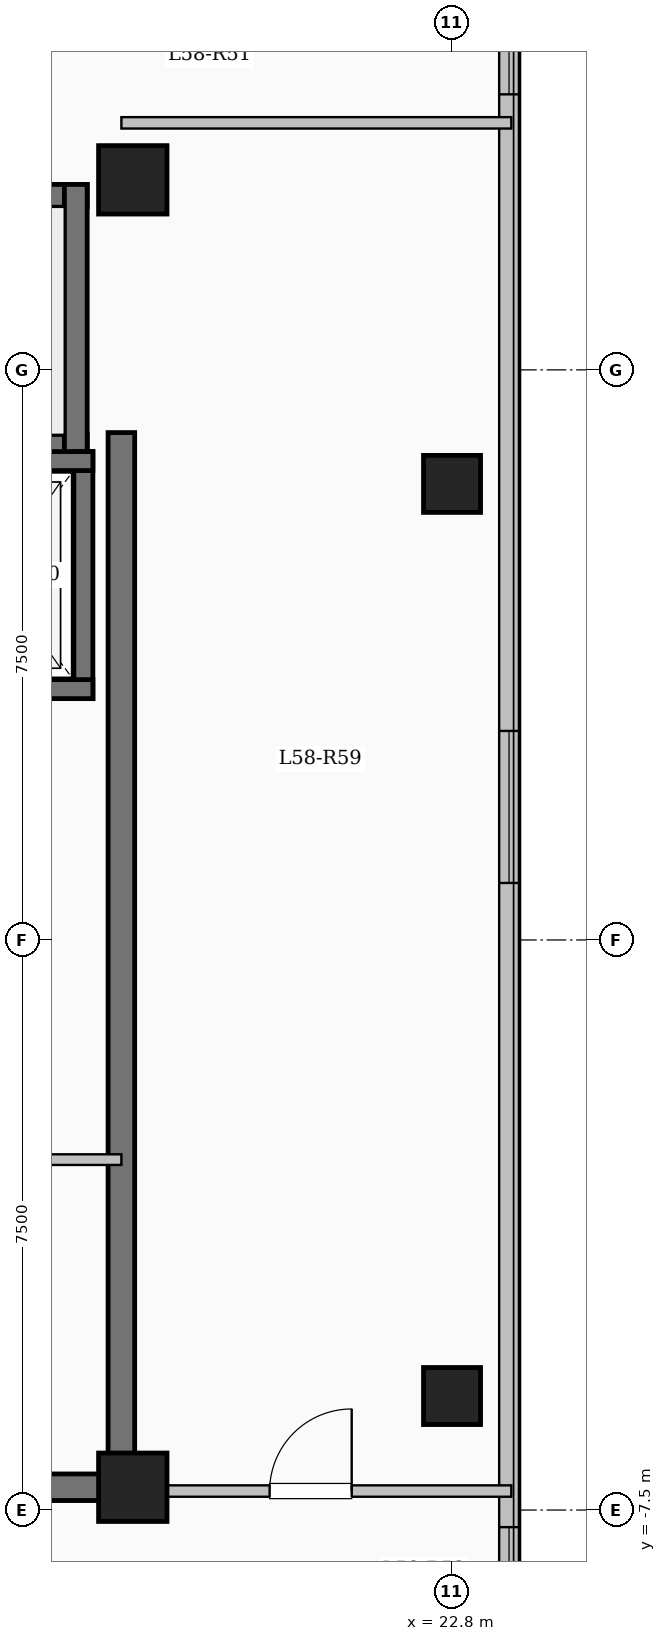
"""IFC4 building model, lengths in metres.
Left out: names, types, materials, properties, quantities, classifications, styles, units other than length and angle.
Written with IfcOpenShell. Run it as: python <this file> out.ifc"""

import sys

from ifc_helpers import new_model, si_unit, direction, frame, frame_2d, origin, origin_2d, place, context, subcontext, project, spatial, rectangle, extrude, element, fill, save


model = new_model("IFC4")
c1 = context("Model", 3, precision=1e-05, world=origin(), true_north=direction((0.0, 1.0)))
c2 = subcontext(c1, "Body", "Model", "MODEL_VIEW")
j1 = project(units=[si_unit("LENGTHUNIT", "METRE"), si_unit("PLANEANGLEUNIT", "RADIAN")], contexts=[c1])
p1 = place(None, origin())
s1 = spatial("IfcSite", under=j1, at=p1, CompositionType="ELEMENT")
p2 = place(p1, origin())
s2 = spatial("IfcBuilding", under=s1, at=p2, CompositionType="ELEMENT")
p3 = place(p2, frame((0.0, 0.0, 213.7)))
s3 = spatial("IfcBuildingStorey", under=s2, at=p3, CompositionType="ELEMENT", Elevation=213.7)
for number, where, z_axis, x_axis in (
    (1, (18.6, -7.2, 0.0), (0.0, 0.0, 1.0), (1.0, 0.0, 0.0)),
    (2, (18.6, 10.0, 0.0), (0.0, 0.0, 1.0), (1.0, 0.0, 0.0)),
):
    element("IfcColumn", number, at=place(p3, frame(where, z_axis=z_axis, x_axis=x_axis)), inside=s3, PredefinedType="COLUMN", context=c2, shape_type="SweptSolid", body=[
        extrude(rectangle(XDim=0.9, YDim=0.9, at=origin_2d()), origin(), (0.0, 0.0, 1.0), 3.35),
    ])
for number, where, z_axis, x_axis in (
    (3, (22.8, -6.0, 0.0), (0.0, 0.0, 1.0), (1.0, 0.0, 0.0)),
    (4, (22.8, 6.0, 0.0), (0.0, 0.0, 1.0), (1.0, 0.0, 0.0)),
):
    element("IfcColumn", number, at=place(p3, frame(where, z_axis=z_axis, x_axis=x_axis)), inside=s3, PredefinedType="COLUMN", context=c2, shape_type="SweptSolid", body=[
        extrude(rectangle(XDim=0.75, YDim=0.75, at=origin_2d()), origin(), (0.0, 0.0, 1.0), 3.35),
    ])
p4 = place(p3, frame((23.55, 17.25, 0.0), z_axis=(0.0, 0.0, 1.0), x_axis=(0.0, -1.0, 0.0)))
e5 = element("IfcWall", 5, at=p4, inside=s3, PredefinedType="SOLIDWALL", context=c2, shape_type="SweptSolid", body=[
    extrude(rectangle(XDim=34.5, YDim=0.26, at=frame_2d((17.25, 0.0))), origin(), (0.0, 0.0, 1.0), 3.1),
])
p5 = place(p4, frame((1.375, 0.0, 0.9)))
e6 = element("IfcOpeningElement", 6, at=p5, cuts=e5, PredefinedType="OPENING", context=c2, shape_type="SweptSolid", body=[
    extrude(rectangle(XDim=2.0, YDim=1.7, at=frame_2d((1.0, 0.85))), frame((0.0, 0.14, 0.0), z_axis=(0.0, -1.0, 0.0), x_axis=(1.0, 0.0, 0.0)), (0.0, 0.0, 1.0), 0.28),
])
p6 = place(p4, frame((5.125, 0.0, 0.95)))
e7 = element("IfcOpeningElement", 7, at=p6, cuts=e5, PredefinedType="OPENING", context=c2, shape_type="SweptSolid", body=[
    extrude(rectangle(XDim=1.0, YDim=1.5, at=frame_2d((0.5, 0.75))), frame((0.0, 0.14, 0.0), z_axis=(0.0, -1.0, 0.0), x_axis=(1.0, 0.0, 0.0)), (0.0, 0.0, 1.0), 0.28),
])
p7 = place(p4, frame((14.5, 0.0, 0.9)))
e8 = element("IfcOpeningElement", 8, at=p7, cuts=e5, PredefinedType="OPENING", context=c2, shape_type="SweptSolid", body=[
    extrude(rectangle(XDim=2.0, YDim=1.7, at=frame_2d((1.0, 0.85))), frame((0.0, 0.14, 0.0), z_axis=(0.0, -1.0, 0.0), x_axis=(1.0, 0.0, 0.0)), (0.0, 0.0, 1.0), 0.28),
])
p8 = place(p4, frame((24.975, 0.0, 0.95)))
e9 = element("IfcOpeningElement", 9, at=p8, cuts=e5, PredefinedType="OPENING", context=c2, shape_type="SweptSolid", body=[
    extrude(rectangle(XDim=1.2, YDim=1.5, at=frame_2d((0.6, 0.75))), frame((0.0, 0.14, 0.0), z_axis=(0.0, -1.0, 0.0), x_axis=(1.0, 0.0, 0.0)), (0.0, 0.0, 1.0), 0.28),
])
p9 = place(p4, frame((29.475, 0.0, 0.9)))
e10 = element("IfcOpeningElement", 10, at=p9, cuts=e5, PredefinedType="OPENING", context=c2, shape_type="SweptSolid", body=[
    extrude(rectangle(XDim=2.2, YDim=1.75, at=frame_2d((1.1, 0.875))), frame((0.0, 0.14, 0.0), z_axis=(0.0, -1.0, 0.0), x_axis=(1.0, 0.0, 0.0)), (0.0, 0.0, 1.0), 0.28),
])
p10 = place(p3, frame((10.0, 9.79, 0.0), z_axis=(0.0, 0.0, 1.0), x_axis=(1.0, 0.0, 0.0)))
e11 = element("IfcWall", 11, at=p10, inside=s3, PredefinedType="SHEAR", context=c2, shape_type="SweptSolid", body=[
    extrude(rectangle(XDim=8.0, YDim=0.3, at=frame_2d((4.0, 0.0))), origin(), (0.0, 0.0, 1.0), 3.35),
])
p11 = place(p3, frame((10.0, 6.5, 0.0), z_axis=(0.0, 0.0, 1.0), x_axis=(1.0, 0.0, 0.0)))
e12 = element("IfcWall", 12, at=p11, inside=s3, PredefinedType="SHEAR", context=c2, shape_type="SweptSolid", body=[
    extrude(rectangle(XDim=8.0, YDim=0.3, at=frame_2d((4.0, 0.0))), origin(), (0.0, 0.0, 1.0), 3.35),
])
p12 = place(p11, frame((0.55, 0.0, 0.0)))
e13 = element("IfcOpeningElement", 13, at=p12, cuts=e12, PredefinedType="OPENING", context=c2, shape_type="SweptSolid", body=[
    extrude(rectangle(XDim=1.0, YDim=2.15, at=frame_2d((0.5, 1.075))), frame((0.0, 0.16, 0.0), z_axis=(0.0, -1.0, 0.0), x_axis=(1.0, 0.0, 0.0)), (0.0, 0.0, 1.0), 0.32),
])
p13 = place(p3, frame((17.85, 6.35, 0.0), z_axis=(0.0, 0.0, 1.0), x_axis=(0.0, 1.0, 0.0)))
e14 = element("IfcWall", 14, at=p13, inside=s3, PredefinedType="SHEAR", context=c2, shape_type="SweptSolid", body=[
    extrude(rectangle(XDim=3.59, YDim=0.3, at=frame_2d((1.795, 0.0))), origin(), (0.0, 0.0, 1.0), 3.35),
])
p14 = place(p3, frame((17.95, 3.175, 0.0), z_axis=(0.0, 0.0, 1.0), x_axis=(0.0, 1.0, 0.0)))
e15 = element("IfcWall", 15, at=p14, inside=s3, PredefinedType="SHEAR", context=c2, shape_type="SweptSolid", body=[
    extrude(rectangle(XDim=3.25, YDim=0.25, at=frame_2d((1.625, 0.0))), origin(), (0.0, 0.0, 1.0), 3.35),
])
for number, where, z_axis, x_axis in (
    (16, (15.525, 3.3, 0.0), (0.0, 0.0, 1.0), (1.0, 0.0, 0.0)),
    (17, (15.525, 6.3, 0.0), (0.0, 0.0, 1.0), (1.0, 0.0, 0.0)),
):
    element("IfcWall", number, at=place(p3, frame(where, z_axis=z_axis, x_axis=x_axis)), inside=s3, PredefinedType="SHEAR", context=c2, shape_type="SweptSolid", body=[
        extrude(rectangle(XDim=2.55, YDim=0.25, at=frame_2d((1.275, 0.0))), origin(), (0.0, 0.0, 1.0), 3.35),
    ])
p15 = place(p3, frame((18.45, -7.375, 0.0), z_axis=(0.0, 0.0, 1.0), x_axis=(0.0, 1.0, 0.0)))
e18 = element("IfcWall", 18, at=p15, inside=s3, PredefinedType="SHEAR", context=c2, shape_type="SweptSolid", body=[
    extrude(rectangle(XDim=14.05, YDim=0.35, at=frame_2d((7.025, 0.0))), origin(), (0.0, 0.0, 1.0), 3.35),
])
p16 = place(p3, frame((12.625, -7.2, 0.0), z_axis=(0.0, 0.0, 1.0), x_axis=(1.0, 0.0, 0.0)))
e19 = element("IfcWall", 19, at=p16, inside=s3, PredefinedType="SHEAR", context=c2, shape_type="SweptSolid", body=[
    extrude(rectangle(XDim=6.0, YDim=0.35, at=frame_2d((3.0, 0.0))), origin(), (0.0, 0.0, 1.0), 3.35),
])
p17 = place(p3, frame((15.4, -2.89, 0.0), z_axis=(0.0, 0.0, 1.0), x_axis=(1.0, 0.0, 0.0)))
e20 = element("IfcWall", 20, at=p17, inside=s3, PredefinedType="PARTITIONING", context=c2, shape_type="SweptSolid", body=[
    extrude(rectangle(XDim=3.05, YDim=0.14, at=frame_2d((1.525, 0.0))), origin(), (0.0, 0.0, 1.0), 3.1),
])
p18 = place(p17, frame((1.05, 0.0, 0.0)))
e21 = element("IfcOpeningElement", 21, at=p18, cuts=e20, PredefinedType="OPENING", context=c2, shape_type="SweptSolid", body=[
    extrude(rectangle(XDim=0.9, YDim=2.08, at=frame_2d((0.45, 1.04))), frame((0.0, 0.08, 0.0), z_axis=(0.0, -1.0, 0.0), x_axis=(1.0, 0.0, 0.0)), (0.0, 0.0, 1.0), 0.16),
])
p19 = place(p3, frame((18.45, -7.25, 0.0), z_axis=(0.0, 0.0, 1.0), x_axis=(1.0, 0.0, 0.0)))
e22 = element("IfcWall", 22, at=p19, inside=s3, PredefinedType="PARTITIONING", context=c2, shape_type="SweptSolid", body=[
    extrude(rectangle(XDim=5.13, YDim=0.15, at=frame_2d((2.565, 0.0))), origin(), (0.0, 0.0, 1.0), 3.1),
])
p20 = place(p19, frame((1.95, 0.0, 0.0)))
e23 = element("IfcOpeningElement", 23, at=p20, cuts=e22, PredefinedType="OPENING", context=c2, shape_type="SweptSolid", body=[
    extrude(rectangle(XDim=1.08, YDim=2.15, at=frame_2d((0.54, 1.075))), frame((0.0, 0.085, 0.0), z_axis=(0.0, -1.0, 0.0), x_axis=(1.0, 0.0, 0.0)), (0.0, 0.0, 1.0), 0.17),
])
p21 = place(p3, frame((18.45, 10.75, 0.0), z_axis=(0.0, 0.0, 1.0), x_axis=(1.0, 0.0, 0.0)))
e24 = element("IfcWall", 24, at=p21, inside=s3, PredefinedType="PARTITIONING", context=c2, shape_type="SweptSolid", body=[
    extrude(rectangle(XDim=5.13, YDim=0.15, at=frame_2d((2.565, 0.0))), origin(), (0.0, 0.0, 1.0), 3.1),
])
p22 = place(p6, origin())
e25 = element("IfcWindow", 25, at=p22, inside=s3, PartitioningType="SINGLE_PANEL", PredefinedType="WINDOW", context=c2, shape_type="SweptSolid", body=[
    extrude(rectangle(XDim=1.0, YDim=1.5, at=frame_2d((0.5, 0.75))), frame((0.0, 0.03, 0.0), z_axis=(0.0, -1.0, 0.0), x_axis=(1.0, 0.0, 0.0)), (0.0, 0.0, 1.0), 0.06),
])
fill(e7, e25)
p23 = place(p7, origin())
e26 = element("IfcWindow", 26, at=p23, inside=s3, PartitioningType="SINGLE_PANEL", PredefinedType="WINDOW", context=c2, shape_type="SweptSolid", body=[
    extrude(rectangle(XDim=2.0, YDim=1.7, at=frame_2d((1.0, 0.85))), frame((0.0, 0.03, 0.0), z_axis=(0.0, -1.0, 0.0), x_axis=(1.0, 0.0, 0.0)), (0.0, 0.0, 1.0), 0.06),
])
fill(e8, e26)
p24 = place(p8, origin())
e27 = element("IfcWindow", 27, at=p24, inside=s3, PartitioningType="SINGLE_PANEL", PredefinedType="WINDOW", context=c2, shape_type="SweptSolid", body=[
    extrude(rectangle(XDim=1.2, YDim=1.5, at=frame_2d((0.6, 0.75))), frame((0.0, 0.03, 0.0), z_axis=(0.0, -1.0, 0.0), x_axis=(1.0, 0.0, 0.0)), (0.0, 0.0, 1.0), 0.06),
])
fill(e9, e27)
p25 = place(p20, origin())
e28 = element("IfcDoor", 28, at=p25, inside=s3, OperationType="SINGLE_SWING_RIGHT", PredefinedType="DOOR", context=c2, shape_type="SweptSolid", body=[
    extrude(rectangle(XDim=1.08, YDim=2.15, at=frame_2d((0.54, 1.075))), frame((0.0, 0.025, 0.0), z_axis=(0.0, -1.0, 0.0), x_axis=(1.0, 0.0, 0.0)), (0.0, 0.0, 1.0), 0.05),
])
fill(e23, e28)
save(model, sys.argv[1])
